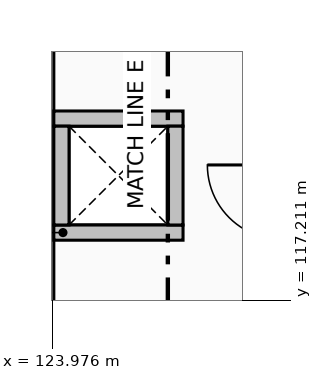
"""IFC4 building model, lengths in metres.
Left out: names, types, materials, properties, quantities, classifications, styles, units other than length and angle.
Written with IfcOpenShell. Run it as: python <this file> out.ifc"""

import sys

from ifc_helpers import new_model, si_unit, direction, frame, frame_2d, origin, place, context, subcontext, project, spatial, rectangle, extrude, element, save


model = new_model("IFC4")
c1 = context("Model", 3, precision=1e-05, world=origin(), true_north=direction((0.0, 1.0)))
c2 = subcontext(c1, "Body", "Model", "MODEL_VIEW")
j1 = project(units=[si_unit("LENGTHUNIT", "METRE"), si_unit("PLANEANGLEUNIT", "RADIAN")], contexts=[c1])
p1 = place(None, origin())
s1 = spatial("IfcSite", under=j1, at=p1, CompositionType="ELEMENT")
p2 = place(p1, origin())
s2 = spatial("IfcBuilding", under=s1, at=p2, CompositionType="ELEMENT")
p3 = place(p2, frame((0.0, 0.0, 5.4)))
s3 = spatial("IfcBuildingStorey", under=s2, at=p3, CompositionType="ELEMENT", Elevation=5.4)
for number, where, z_axis, x_axis in (
    (1, (124.0, 118.1, 0.0), (0.0, 0.0, 1.0), (1.0, 0.0, 0.0)),
    (2, (125.7, 119.6, 0.0), (0.0, 0.0, 1.0), (-1.0, 0.0, 0.0)),
):
    element("IfcWall", number, at=place(p3, frame(where, z_axis=z_axis, x_axis=x_axis)), inside=s3, PredefinedType="PARTITIONING", context=c2, shape_type="SweptSolid", body=[
        extrude(rectangle(XDim=1.7, YDim=0.2, at=frame_2d((0.85, 0.0))), origin(), (0.0, 0.0, 1.0), 4.5),
    ])
for number, where, z_axis, x_axis in (
    (3, (124.1, 118.2, 0.0), (0.0, 0.0, 1.0), (0.0, 1.0, 0.0)),
    (4, (125.6, 119.5, 0.0), (0.0, 0.0, 1.0), (0.0, -1.0, 0.0)),
):
    element("IfcWall", number, at=place(p3, frame(where, z_axis=z_axis, x_axis=x_axis)), inside=s3, PredefinedType="PARTITIONING", context=c2, shape_type="SweptSolid", body=[
        extrude(rectangle(XDim=1.3, YDim=0.2, at=frame_2d((0.65, 0.0))), origin(), (0.0, 0.0, 1.0), 4.5),
    ])
save(model, sys.argv[1])
